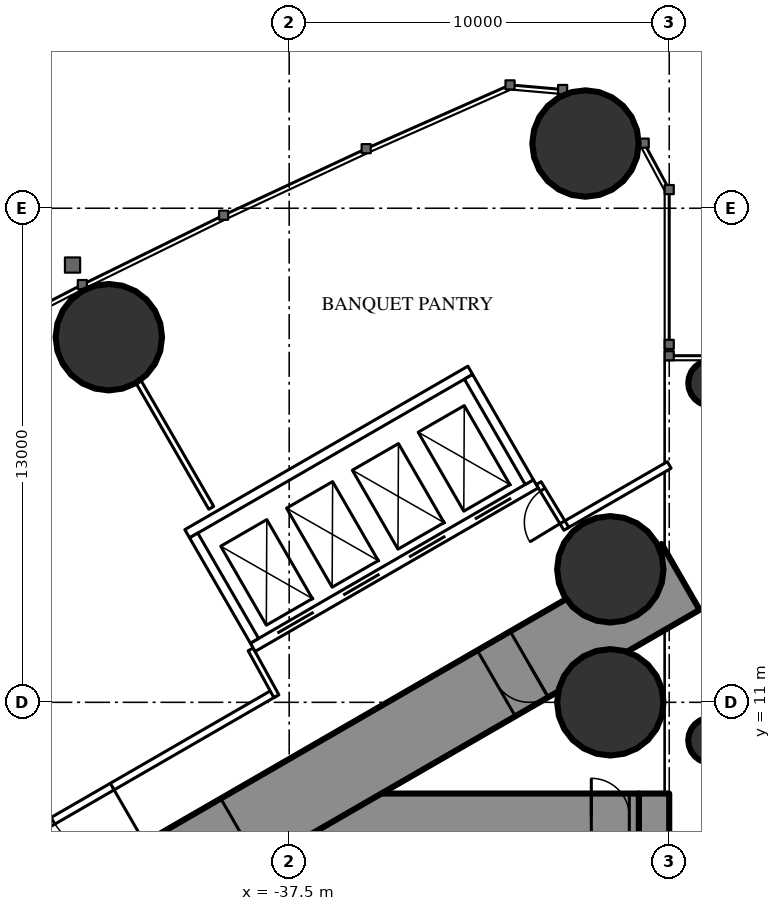
"""IFC4 building model, lengths in metres.
Left out: names, types, materials, properties, quantities, classifications, styles, units other than length and angle.
Written with IfcOpenShell. Run it as: python <this file> out.ifc"""

import sys

from ifc_helpers import new_model, si_unit, direction, frame, frame_2d, origin, origin_2d, place, context, subcontext, project, spatial, rectangle, circle, hollow_circle, extrude, element, fill, save


model = new_model("IFC4")
c1 = context("Model", 3, precision=1e-05, world=origin(), true_north=direction((0.0, 1.0)))
c2 = subcontext(c1, "Body", "Model", "MODEL_VIEW")
j1 = project(units=[si_unit("LENGTHUNIT", "METRE"), si_unit("PLANEANGLEUNIT", "RADIAN")], contexts=[c1])
p1 = place(None, origin())
s1 = spatial("IfcSite", under=j1, at=p1, CompositionType="ELEMENT")
p2 = place(p1, origin())
s2 = spatial("IfcBuilding", under=s1, at=p2, CompositionType="ELEMENT")
p3 = place(p2, frame((0.0, 0.0, 7.2)))
s3 = spatial("IfcBuildingStorey", under=s2, at=p3, CompositionType="ELEMENT", Elevation=7.2)
for number, where, z_axis, x_axis in (
    (1, (-29.703, 25.703, 0.0), (0.0, 0.0, 1.0), (1.0, 0.0, 0.0)),
    (2, (-29.05, 11.0, 0.0), (0.0, 0.0, 1.0), (1.0, 0.0, 0.0)),
    (3, (-29.05, 14.5, 0.0), (0.0, 0.0, 1.0), (1.0, 0.0, 0.0)),
    (4, (-42.245, 20.607, 0.0), (0.0, 0.0, 1.0), (1.0, 0.0, 0.0)),
):
    element("IfcColumn", number, at=place(p3, frame(where, z_axis=z_axis, x_axis=x_axis)), inside=s3, PredefinedType="COLUMN", context=c2, shape_type="SweptSolid", body=[
        extrude(hollow_circle(Radius=1.4, WallThickness=0.12, at=origin_2d()), origin(), (0.0, 0.0, 1.0), 5.4),
    ])
p4 = place(p3, frame((-27.9, 8.6, 0.0), z_axis=(0.0, 0.0, 1.0), x_axis=(0.0, -1.0, 0.0)))
e5 = element("IfcWall", 5, at=p4, inside=s3, PredefinedType="SHEAR", context=c2, shape_type="SweptSolid", body=[
    extrude(rectangle(XDim=17.2, YDim=0.8, at=frame_2d((8.6, 0.0))), origin(), (0.0, 0.0, 1.0), 5.4),
])
p5 = place(p3, frame((-37.3, 8.6, 0.0), z_axis=(0.0, 0.0, 1.0), x_axis=(0.0, -1.0, 0.0)))
e6 = element("IfcWall", 6, at=p5, inside=s3, PredefinedType="SHEAR", context=c2, shape_type="SweptSolid", body=[
    extrude(rectangle(XDim=17.2, YDim=1.2, at=frame_2d((8.6, 0.0))), origin(), (0.0, 0.0, 1.0), 5.4),
])
p6 = place(p5, frame((7.7, 0.0, 0.0)))
e7 = element("IfcOpeningElement", 7, at=p6, cuts=e6, PredefinedType="OPENING", context=c2, shape_type="SweptSolid", body=[
    extrude(rectangle(XDim=1.8, YDim=2.2, at=frame_2d((0.9, 1.1))), frame((0.0, 0.61, 0.0), z_axis=(0.0, -1.0, 0.0), x_axis=(1.0, 0.0, 0.0)), (0.0, 0.0, 1.0), 1.22),
])
p7 = place(p3, frame((-28.3, 8.0, 0.0), z_axis=(0.0, 0.0, 1.0), x_axis=(-1.0, 0.0, 0.0)))
e8 = element("IfcWall", 8, at=p7, inside=s3, PredefinedType="SHEAR", context=c2, shape_type="SweptSolid", body=[
    extrude(rectangle(XDim=8.4, YDim=1.2, at=frame_2d((4.2, 0.0))), origin(), (0.0, 0.0, 1.0), 5.4),
])
p8 = place(p7, frame((0.25, 0.0, 0.0)))
e9 = element("IfcOpeningElement", 9, at=p8, cuts=e8, PredefinedType="OPENING", context=c2, shape_type="SweptSolid", body=[
    extrude(rectangle(XDim=1.0, YDim=2.2, at=frame_2d((0.5, 1.1))), frame((0.0, 0.61, 0.0), z_axis=(0.0, -1.0, 0.0), x_axis=(1.0, 0.0, 0.0)), (0.0, 0.0, 1.0), 1.22),
])
p9 = place(p3, frame((-27.2, 14.3, 0.0), z_axis=(0.0, 0.0, 1.0), x_axis=(-0.866026593062, -0.499997940104, 0.0)))
e10 = element("IfcWall", 10, at=p9, inside=s3, PredefinedType="SHEAR", context=c2, shape_type="SweptSolid", body=[
    extrude(rectangle(XDim=28.946, YDim=2.0, at=frame_2d((14.473, 0.0))), origin(), (0.0, 0.0, 1.0), 5.4),
])
p10 = place(p9, frame((4.6, 0.0, 0.0)))
e11 = element("IfcOpeningElement", 11, at=p10, cuts=e10, PredefinedType="OPENING", context=c2, shape_type="SweptSolid", body=[
    extrude(rectangle(XDim=1.0, YDim=2.2, at=frame_2d((0.5, 1.1))), frame((0.0, 1.01, 0.0), z_axis=(0.0, -1.0, 0.0), x_axis=(1.0, 0.0, 0.0)), (0.0, 0.0, 1.0), 2.02),
])
p11 = place(p9, frame((13.395, 0.0, 0.0)))
e12 = element("IfcOpeningElement", 12, at=p11, cuts=e10, PredefinedType="OPENING", context=c2, shape_type="SweptSolid", body=[
    extrude(rectangle(XDim=1.8, YDim=2.2, at=frame_2d((0.9, 1.1))), frame((0.0, 1.01, 0.0), z_axis=(0.0, -1.0, 0.0), x_axis=(1.0, 0.0, 0.0)), (0.0, 0.0, 1.0), 2.02),
])
for number, where, z_axis, x_axis in (
    (13, (-26.4, 10.0, 0.0), (0.0, 0.0, 1.0), (1.0, 0.0, 0.0)),
    (14, (-26.4, 19.4, 0.0), (0.0, 0.0, 1.0), (1.0, 0.0, 0.0)),
):
    element("IfcColumn", number, at=place(p3, frame(where, z_axis=z_axis, x_axis=x_axis)), inside=s3, PredefinedType="COLUMN", context=c2, shape_type="SweptSolid", body=[
        extrude(circle(Radius=0.6, at=origin_2d()), origin(), (0.0, 0.0, 1.0), 5.4),
    ])
p12 = place(p3, frame((-39.551, 16.119, 0.0), z_axis=(0.0, 0.0, 1.0), x_axis=(-0.500014214979, 0.866017196607, 0.0)))
e15 = element("IfcWall", 15, at=p12, inside=s3, PredefinedType="PARTITIONING", context=c2, shape_type="SweptSolid", body=[
    extrude(rectangle(XDim=3.815, YDim=0.15, at=frame_2d((1.907, 0.0))), origin(), (0.0, 0.0, 1.0), 5.05),
])
p13 = place(p3, frame((-27.5, 17.244, 0.0), z_axis=(0.0, 0.0, 1.0), x_axis=(-0.866039316896, -0.499975901009, 0.0)))
e16 = element("IfcWall", 16, at=p13, inside=s3, PredefinedType="PARTITIONING", context=c2, shape_type="SweptSolid", body=[
    extrude(rectangle(XDim=3.169, YDim=0.2, at=frame_2d((1.584, 0.0))), origin(), (0.0, 0.0, 1.0), 5.05),
])
p14 = place(p3, frame((-37.9, 11.24, 0.0), z_axis=(0.0, 0.0, 1.0), x_axis=(-0.866022995118, -0.50000417191, 0.0)))
e17 = element("IfcWall", 17, at=p14, inside=s3, PredefinedType="PARTITIONING", context=c2, shape_type="SweptSolid", body=[
    extrude(rectangle(XDim=22.48, YDim=0.2, at=frame_2d((11.24, 0.0))), origin(), (0.0, 0.0, 1.0), 5.05),
])
p15 = place(p14, frame((14.644, 0.0, 0.0)))
e18 = element("IfcOpeningElement", 18, at=p15, cuts=e17, PredefinedType="OPENING", context=c2, shape_type="SweptSolid", body=[
    extrude(rectangle(XDim=1.8, YDim=2.2, at=frame_2d((0.9, 1.1))), frame((0.0, 0.11, 0.0), z_axis=(0.0, -1.0, 0.0), x_axis=(1.0, 0.0, 0.0)), (0.0, 0.0, 1.0), 0.22),
])
p16 = place(p14, frame((20.069, 0.0, 0.0)))
e19 = element("IfcOpeningElement", 19, at=p16, cuts=e17, PredefinedType="OPENING", context=c2, shape_type="SweptSolid", body=[
    extrude(rectangle(XDim=1.8, YDim=2.2, at=frame_2d((0.9, 1.1))), frame((0.0, 0.11, 0.0), z_axis=(0.0, -1.0, 0.0), x_axis=(1.0, 0.0, 0.0)), (0.0, 0.0, 1.0), 0.22),
])
p17 = place(p14, frame((4.915, 0.0, 0.0)))
e20 = element("IfcOpeningElement", 20, at=p17, cuts=e17, PredefinedType="OPENING", context=c2, shape_type="SweptSolid", body=[
    extrude(rectangle(XDim=1.8, YDim=2.2, at=frame_2d((0.9, 1.1))), frame((0.0, 0.11, 0.0), z_axis=(0.0, -1.0, 0.0), x_axis=(1.0, 0.0, 0.0)), (0.0, 0.0, 1.0), 0.22),
])
p18 = place(p3, frame((-30.207, 15.566, 0.0), z_axis=(0.0, 0.0, 1.0), x_axis=(-0.518374889333, 0.855153479855, 0.0)))
e21 = element("IfcWall", 21, at=p18, inside=s3, PredefinedType="PARTITIONING", context=c2, shape_type="SweptSolid", body=[
    extrude(rectangle(XDim=1.405, YDim=0.15, at=frame_2d((0.703, 0.0))), origin(), (0.0, 0.0, 1.0), 5.05),
])
p19 = place(p18, frame((0.202, 0.0, 0.0)))
e22 = element("IfcOpeningElement", 22, at=p19, cuts=e21, PredefinedType="OPENING", context=c2, shape_type="SweptSolid", body=[
    extrude(rectangle(XDim=1.0, YDim=2.2, at=frame_2d((0.5, 1.1))), frame((0.0, 0.085, 0.0), z_axis=(0.0, -1.0, 0.0), x_axis=(1.0, 0.0, 0.0)), (0.0, 0.0, 1.0), 0.17),
])
p20 = place(p3, frame((-38.513, 12.392, 0.0), z_axis=(0.0, 0.0, 1.0), x_axis=(0.481358300093, -0.876523922624, 0.0)))
e23 = element("IfcWall", 23, at=p20, inside=s3, PredefinedType="PARTITIONING", context=c2, shape_type="SweptSolid", body=[
    extrude(rectangle(XDim=1.405, YDim=0.15, at=frame_2d((0.703, 0.0))), origin(), (0.0, 0.0, 1.0), 5.05),
])
p21 = place(p3, frame((-31.01, 16.747, 0.0), z_axis=(0.0, 0.0, 1.0), x_axis=(-0.866028165386, -0.499995216735, 0.0)))
e24 = element("IfcWall", 24, at=p21, inside=s3, PredefinedType="PARTITIONING", context=c2, shape_type="SweptSolid", body=[
    extrude(rectangle(XDim=8.6, YDim=0.25, at=frame_2d((4.3, 0.0))), origin(), (0.0, 0.0, 1.0), 5.05),
])
p22 = place(p21, frame((0.75, 0.0, 0.0)))
e25 = element("IfcOpeningElement", 25, at=p22, cuts=e24, PredefinedType="OPENING", context=c2, shape_type="SweptSolid", body=[
    extrude(rectangle(XDim=1.1, YDim=2.2, at=frame_2d((0.55, 1.1))), frame((0.0, 0.135, 0.0), z_axis=(0.0, -1.0, 0.0), x_axis=(1.0, 0.0, 0.0)), (0.0, 0.0, 1.0), 0.27),
])
p23 = place(p21, frame((2.75, 0.0, 0.0)))
e26 = element("IfcOpeningElement", 26, at=p23, cuts=e24, PredefinedType="OPENING", context=c2, shape_type="SweptSolid", body=[
    extrude(rectangle(XDim=1.1, YDim=2.2, at=frame_2d((0.55, 1.1))), frame((0.0, 0.135, 0.0), z_axis=(0.0, -1.0, 0.0), x_axis=(1.0, 0.0, 0.0)), (0.0, 0.0, 1.0), 0.27),
])
p24 = place(p21, frame((4.75, 0.0, 0.0)))
e27 = element("IfcOpeningElement", 27, at=p24, cuts=e24, PredefinedType="OPENING", context=c2, shape_type="SweptSolid", body=[
    extrude(rectangle(XDim=1.1, YDim=2.2, at=frame_2d((0.55, 1.1))), frame((0.0, 0.135, 0.0), z_axis=(0.0, -1.0, 0.0), x_axis=(1.0, 0.0, 0.0)), (0.0, 0.0, 1.0), 0.27),
])
p25 = place(p21, frame((6.75, 0.0, 0.0)))
e28 = element("IfcOpeningElement", 28, at=p25, cuts=e24, PredefinedType="OPENING", context=c2, shape_type="SweptSolid", body=[
    extrude(rectangle(XDim=1.1, YDim=2.2, at=frame_2d((0.55, 1.1))), frame((0.0, 0.135, 0.0), z_axis=(0.0, -1.0, 0.0), x_axis=(1.0, 0.0, 0.0)), (0.0, 0.0, 1.0), 0.27),
])
p26 = place(p3, frame((-32.736, 19.736, 0.0), z_axis=(0.0, 0.0, 1.0), x_axis=(-0.866028165386, -0.499995216735, 0.0)))
e29 = element("IfcWall", 29, at=p26, inside=s3, PredefinedType="PARTITIONING", context=c2, shape_type="SweptSolid", body=[
    extrude(rectangle(XDim=8.6, YDim=0.25, at=frame_2d((4.3, 0.0))), origin(), (0.0, 0.0, 1.0), 5.05),
])
p27 = place(p3, frame((-31.181, 16.793, 0.0), z_axis=(0.0, 0.0, 1.0), x_axis=(-0.499929347863, 0.866066190972, 0.0)))
e30 = element("IfcWall", 30, at=p27, inside=s3, PredefinedType="PARTITIONING", context=c2, shape_type="SweptSolid", body=[
    extrude(rectangle(XDim=3.201, YDim=0.25, at=frame_2d((1.6, 0.0))), origin(), (0.0, 0.0, 1.0), 5.05),
])
p28 = place(p3, frame((-38.413, 12.618, 0.0), z_axis=(0.0, 0.0, 1.0), x_axis=(-0.499872130319, 0.866099216793, 0.0)))
e31 = element("IfcWall", 31, at=p28, inside=s3, PredefinedType="PARTITIONING", context=c2, shape_type="SweptSolid", body=[
    extrude(rectangle(XDim=3.2, YDim=0.25, at=frame_2d((1.6, 0.0))), origin(), (0.0, 0.0, 1.0), 5.05),
])
p29 = place(p19, origin())
e32 = element("IfcDoor", 32, at=p29, inside=s3, OperationType="SINGLE_SWING_LEFT", PredefinedType="DOOR", context=c2, shape_type="SweptSolid", body=[
    extrude(rectangle(XDim=1.0, YDim=2.2, at=frame_2d((0.5, 1.1))), frame((0.0, 0.025, 0.0), z_axis=(0.0, -1.0, 0.0), x_axis=(1.0, 0.0, 0.0)), (0.0, 0.0, 1.0), 0.05),
])
fill(e22, e32)
p30 = place(p17, origin())
e33 = element("IfcDoor", 33, at=p30, inside=s3, OperationType="DOUBLE_DOOR_SINGLE_SWING", PredefinedType="DOOR", context=c2, shape_type="SweptSolid", body=[
    extrude(rectangle(XDim=1.8, YDim=2.2, at=frame_2d((0.9, 1.1))), frame((0.0, 0.025, 0.0), z_axis=(0.0, -1.0, 0.0), x_axis=(1.0, 0.0, 0.0)), (0.0, 0.0, 1.0), 0.05),
])
fill(e20, e33)
p31 = place(p10, origin())
e34 = element("IfcDoor", 34, at=p31, inside=s3, OperationType="SINGLE_SWING_LEFT", PredefinedType="DOOR", context=c2, shape_type="SweptSolid", body=[
    extrude(rectangle(XDim=1.0, YDim=2.2, at=frame_2d((0.5, 1.1))), frame((0.0, 0.025, 0.0), z_axis=(0.0, -1.0, 0.0), x_axis=(1.0, 0.0, 0.0)), (0.0, 0.0, 1.0), 0.05),
])
fill(e11, e34)
p32 = place(p11, origin())
e35 = element("IfcDoor", 35, at=p32, inside=s3, OperationType="DOUBLE_DOOR_SINGLE_SWING", PredefinedType="DOOR", context=c2, shape_type="SweptSolid", body=[
    extrude(rectangle(XDim=1.8, YDim=2.2, at=frame_2d((0.9, 1.1))), frame((0.0, 0.025, 0.0), z_axis=(0.0, -1.0, 0.0), x_axis=(1.0, 0.0, 0.0)), (0.0, 0.0, 1.0), 0.05),
])
fill(e12, e35)
p33 = place(p8, origin())
e36 = element("IfcDoor", 36, at=p33, inside=s3, OperationType="SINGLE_SWING_RIGHT", PredefinedType="DOOR", context=c2, shape_type="SweptSolid", body=[
    extrude(rectangle(XDim=1.0, YDim=2.2, at=frame_2d((0.5, 1.1))), frame((0.0, 0.025, 0.0), z_axis=(0.0, -1.0, 0.0), x_axis=(1.0, 0.0, 0.0)), (0.0, 0.0, 1.0), 0.05),
])
fill(e9, e36)
p34 = place(p22, origin())
e37 = element("IfcDoor", 37, at=p34, inside=s3, OperationType="DOUBLE_DOOR_SLIDING", PredefinedType="USERDEFINED", context=c2, shape_type="SweptSolid", body=[
    extrude(rectangle(XDim=1.1, YDim=2.2, at=frame_2d((0.55, 1.1))), frame((0.0, 0.025, 0.0), z_axis=(0.0, -1.0, 0.0), x_axis=(1.0, 0.0, 0.0)), (0.0, 0.0, 1.0), 0.05),
])
fill(e25, e37)
p35 = place(p23, origin())
e38 = element("IfcDoor", 38, at=p35, inside=s3, OperationType="DOUBLE_DOOR_SLIDING", PredefinedType="USERDEFINED", context=c2, shape_type="SweptSolid", body=[
    extrude(rectangle(XDim=1.1, YDim=2.2, at=frame_2d((0.55, 1.1))), frame((0.0, 0.025, 0.0), z_axis=(0.0, -1.0, 0.0), x_axis=(1.0, 0.0, 0.0)), (0.0, 0.0, 1.0), 0.05),
])
fill(e26, e38)
p36 = place(p24, origin())
e39 = element("IfcDoor", 39, at=p36, inside=s3, OperationType="DOUBLE_DOOR_SLIDING", PredefinedType="USERDEFINED", context=c2, shape_type="SweptSolid", body=[
    extrude(rectangle(XDim=1.1, YDim=2.2, at=frame_2d((0.55, 1.1))), frame((0.0, 0.025, 0.0), z_axis=(0.0, -1.0, 0.0), x_axis=(1.0, 0.0, 0.0)), (0.0, 0.0, 1.0), 0.05),
])
fill(e27, e39)
p37 = place(p25, origin())
e40 = element("IfcDoor", 40, at=p37, inside=s3, OperationType="DOUBLE_DOOR_SLIDING", PredefinedType="USERDEFINED", context=c2, shape_type="SweptSolid", body=[
    extrude(rectangle(XDim=1.1, YDim=2.2, at=frame_2d((0.55, 1.1))), frame((0.0, 0.025, 0.0), z_axis=(0.0, -1.0, 0.0), x_axis=(1.0, 0.0, 0.0)), (0.0, 0.0, 1.0), 0.05),
])
fill(e28, e40)
save(model, sys.argv[1])
